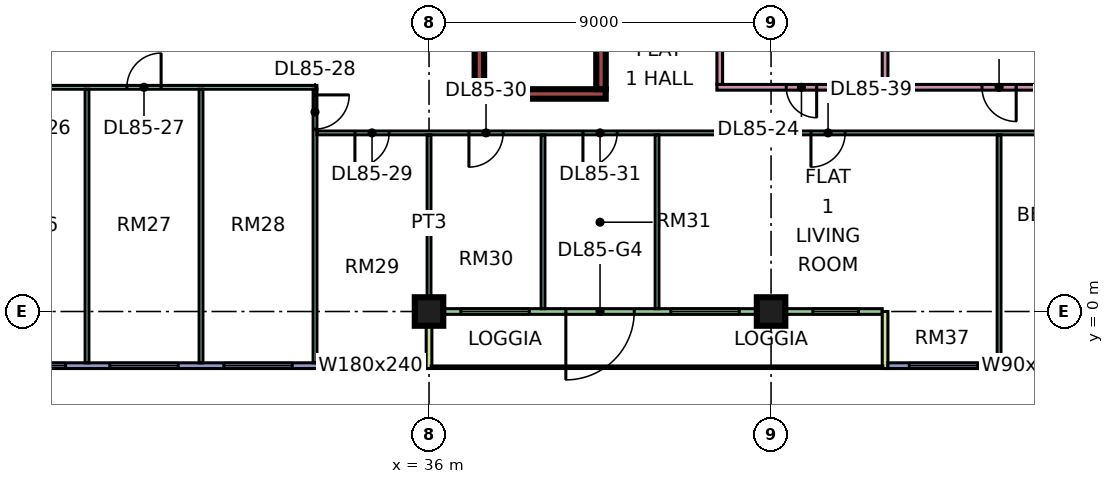
"""IFC4 building model, lengths in metres.
Left out: names, types, materials, properties, quantities, classifications, styles, units other than length and angle.
Written with IfcOpenShell. Run it as: python <this file> out.ifc"""

import sys

from ifc_helpers import new_model, si_unit, direction, frame, frame_2d, origin, origin_2d, place, context, subcontext, project, spatial, rectangle, extrude, element, fill, save


model = new_model("IFC4")
c1 = context("Model", 3, precision=1e-05, world=origin(), true_north=direction((0.0, 1.0)))
c2 = subcontext(c1, "Body", "Model", "MODEL_VIEW")
j1 = project(units=[si_unit("LENGTHUNIT", "METRE"), si_unit("PLANEANGLEUNIT", "RADIAN")], contexts=[c1])
p1 = place(None, origin())
s1 = spatial("IfcSite", under=j1, at=p1, CompositionType="ELEMENT")
p2 = place(p1, origin())
s2 = spatial("IfcBuilding", under=s1, at=p2, CompositionType="ELEMENT")
p3 = place(p2, frame((0.0, 0.0, 365.15)))
s3 = spatial("IfcBuildingStorey", under=s2, at=p3, CompositionType="ELEMENT", Elevation=365.15)
for number, where, z_axis, x_axis in (
    (1, (36.0, 0.0, 0.0), (0.0, 0.0, 1.0), (1.0, 0.0, 0.0)),
    (2, (45.0, 0.0, 0.0), (0.0, 0.0, 1.0), (1.0, 0.0, 0.0)),
):
    element("IfcColumn", number, at=place(p3, frame(where, z_axis=z_axis, x_axis=x_axis)), inside=s3, PredefinedType="COLUMN", context=c2, shape_type="SweptSolid", body=[
        extrude(rectangle(XDim=0.75, YDim=0.75, at=origin_2d()), origin(), (0.0, 0.0, 1.0), 3.75),
    ])
p4 = place(p3, frame((37.2, 5.725, 0.0), z_axis=(0.0, 0.0, 1.0), x_axis=(1.0, 0.0, 0.0)))
e3 = element("IfcWall", 3, at=p4, inside=s3, PredefinedType="SHEAR", context=c2, shape_type="SweptSolid", body=[
    extrude(rectangle(XDim=3.45, YDim=0.25, at=frame_2d((1.725, 0.0))), origin(), (0.0, 0.0, 1.0), 3.75),
])
for number, where, z_axis, x_axis in (
    (4, (37.325, 5.85, 0.0), (0.0, 0.0, 1.0), (0.0, 1.0, 0.0)),
    (5, (40.525, 5.85, 0.0), (0.0, 0.0, 1.0), (0.0, 1.0, 0.0)),
):
    element("IfcWall", number, at=place(p3, frame(where, z_axis=z_axis, x_axis=x_axis)), inside=s3, PredefinedType="SHEAR", context=c2, shape_type="SweptSolid", body=[
        extrude(rectangle(XDim=6.5, YDim=0.25, at=frame_2d((3.25, 0.0))), origin(), (0.0, 0.0, 1.0), 3.75),
    ])
p5 = place(p3, frame((24.075, -1.425, 0.0), z_axis=(0.0, 0.0, 1.0), x_axis=(1.0, 0.0, 0.0)))
e6 = element("IfcWall", 6, at=p5, inside=s3, PredefinedType="SOLIDWALL", context=c2, shape_type="SweptSolid", body=[
    extrude(rectangle(XDim=11.85, YDim=0.15, at=frame_2d((5.925, 0.0))), origin(), (0.0, 0.0, 1.0), 3.35),
])
p6 = place(p5, frame((0.562, 0.0, 0.45)))
e7 = element("IfcOpeningElement", 7, at=p6, cuts=e6, PredefinedType="OPENING", context=c2, shape_type="SweptSolid", body=[
    extrude(rectangle(XDim=1.8, YDim=2.4, at=frame_2d((0.9, 1.2))), frame((0.0, 0.085, 0.0), z_axis=(0.0, -1.0, 0.0), x_axis=(1.0, 0.0, 0.0)), (0.0, 0.0, 1.0), 0.17),
])
p7 = place(p5, frame((3.525, 0.0, 0.45)))
e8 = element("IfcOpeningElement", 8, at=p7, cuts=e6, PredefinedType="OPENING", context=c2, shape_type="SweptSolid", body=[
    extrude(rectangle(XDim=1.8, YDim=2.4, at=frame_2d((0.9, 1.2))), frame((0.0, 0.085, 0.0), z_axis=(0.0, -1.0, 0.0), x_axis=(1.0, 0.0, 0.0)), (0.0, 0.0, 1.0), 0.17),
])
p8 = place(p5, frame((6.525, 0.0, 0.45)))
e9 = element("IfcOpeningElement", 9, at=p8, cuts=e6, PredefinedType="OPENING", context=c2, shape_type="SweptSolid", body=[
    extrude(rectangle(XDim=1.8, YDim=2.4, at=frame_2d((0.9, 1.2))), frame((0.0, 0.085, 0.0), z_axis=(0.0, -1.0, 0.0), x_axis=(1.0, 0.0, 0.0)), (0.0, 0.0, 1.0), 0.17),
])
p9 = place(p5, frame((9.488, 0.0, 0.45)))
e10 = element("IfcOpeningElement", 10, at=p9, cuts=e6, PredefinedType="OPENING", context=c2, shape_type="SweptSolid", body=[
    extrude(rectangle(XDim=1.8, YDim=2.4, at=frame_2d((0.9, 1.2))), frame((0.0, 0.085, 0.0), z_axis=(0.0, -1.0, 0.0), x_axis=(1.0, 0.0, 0.0)), (0.0, 0.0, 1.0), 0.17),
])
p10 = place(p3, frame((36.075, 0.0, 0.0), z_axis=(0.0, 0.0, 1.0), x_axis=(1.0, 0.0, 0.0)))
e11 = element("IfcWall", 11, at=p10, inside=s3, PredefinedType="SOLIDWALL", context=c2, shape_type="SweptSolid", body=[
    extrude(rectangle(XDim=11.85, YDim=0.15, at=frame_2d((5.925, 0.0))), origin(), (0.0, 0.0, 1.0), 3.35),
])
p11 = place(p10, frame((0.762, 0.0, 0.45)))
e12 = element("IfcOpeningElement", 12, at=p11, cuts=e11, PredefinedType="OPENING", context=c2, shape_type="SweptSolid", body=[
    extrude(rectangle(XDim=1.8, YDim=2.4, at=frame_2d((0.9, 1.2))), frame((0.0, 0.085, 0.0), z_axis=(0.0, -1.0, 0.0), x_axis=(1.0, 0.0, 0.0)), (0.0, 0.0, 1.0), 0.17),
])
p12 = place(p10, frame((3.525, 0.0, 0.0)))
e13 = element("IfcOpeningElement", 13, at=p12, cuts=e11, PredefinedType="OPENING", context=c2, shape_type="SweptSolid", body=[
    extrude(rectangle(XDim=1.8, YDim=2.4, at=frame_2d((0.9, 1.2))), frame((0.0, 0.085, 0.0), z_axis=(0.0, -1.0, 0.0), x_axis=(1.0, 0.0, 0.0)), (0.0, 0.0, 1.0), 0.17),
])
p13 = place(p10, frame((6.288, 0.0, 0.45)))
e14 = element("IfcOpeningElement", 14, at=p13, cuts=e11, PredefinedType="OPENING", context=c2, shape_type="SweptSolid", body=[
    extrude(rectangle(XDim=1.8, YDim=2.4, at=frame_2d((0.9, 1.2))), frame((0.0, 0.085, 0.0), z_axis=(0.0, -1.0, 0.0), x_axis=(1.0, 0.0, 0.0)), (0.0, 0.0, 1.0), 0.17),
])
p14 = place(p10, frame((10.025, 0.0, 0.45)))
e15 = element("IfcOpeningElement", 15, at=p14, cuts=e11, PredefinedType="OPENING", context=c2, shape_type="SweptSolid", body=[
    extrude(rectangle(XDim=1.2, YDim=2.4, at=frame_2d((0.6, 1.2))), frame((0.0, 0.085, 0.0), z_axis=(0.0, -1.0, 0.0), x_axis=(1.0, 0.0, 0.0)), (0.0, 0.0, 1.0), 0.17),
])
for number, where, z_axis, x_axis in (
    (16, (36.0, -1.5, 0.0), (0.0, 0.0, 1.0), (0.0, 1.0, 0.0)),
    (17, (48.0, -1.5, 0.0), (0.0, 0.0, 1.0), (0.0, 1.0, 0.0)),
):
    element("IfcWall", number, at=place(p3, frame(where, z_axis=z_axis, x_axis=x_axis)), inside=s3, PredefinedType="SOLIDWALL", context=c2, shape_type="SweptSolid", body=[
        extrude(rectangle(XDim=1.5, YDim=0.15, at=frame_2d((0.75, 0.0))), origin(), (0.0, 0.0, 1.0), 3.35),
    ])
p15 = place(p3, frame((48.075, -1.425, 0.0), z_axis=(0.0, 0.0, 1.0), x_axis=(1.0, 0.0, 0.0)))
e18 = element("IfcWall", 18, at=p15, inside=s3, PredefinedType="SOLIDWALL", context=c2, shape_type="SweptSolid", body=[
    extrude(rectangle(XDim=4.425, YDim=0.15, at=frame_2d((2.212, 0.0))), origin(), (0.0, 0.0, 1.0), 3.35),
])
p16 = place(p15, frame((0.562, 0.0, 0.45)))
e19 = element("IfcOpeningElement", 19, at=p16, cuts=e18, PredefinedType="OPENING", context=c2, shape_type="SweptSolid", body=[
    extrude(rectangle(XDim=1.8, YDim=2.4, at=frame_2d((0.9, 1.2))), frame((0.0, 0.085, 0.0), z_axis=(0.0, -1.0, 0.0), x_axis=(1.0, 0.0, 0.0)), (0.0, 0.0, 1.0), 0.17),
])
p17 = place(p15, frame((3.225, 0.0, 0.45)))
e20 = element("IfcOpeningElement", 20, at=p17, cuts=e18, PredefinedType="OPENING", context=c2, shape_type="SweptSolid", body=[
    extrude(rectangle(XDim=0.9, YDim=2.4, at=frame_2d((0.45, 1.2))), frame((0.0, 0.085, 0.0), z_axis=(0.0, -1.0, 0.0), x_axis=(1.0, 0.0, 0.0)), (0.0, 0.0, 1.0), 0.17),
])
p18 = place(p3, frame((11.95, 5.9, 0.0), z_axis=(0.0, 0.0, 1.0), x_axis=(1.0, 0.0, 0.0)))
e21 = element("IfcWall", 21, at=p18, inside=s3, PredefinedType="PARTITIONING", context=c2, shape_type="SweptSolid", body=[
    extrude(rectangle(XDim=21.1, YDim=0.1, at=frame_2d((10.55, 0.0))), origin(), (0.0, 0.0, 1.0), 3.35),
])
p19 = place(p18, frame((1.1, 0.0, 0.0)))
e22 = element("IfcOpeningElement", 22, at=p19, cuts=e21, PredefinedType="OPENING", context=c2, shape_type="SweptSolid", body=[
    extrude(rectangle(XDim=0.9, YDim=2.1, at=frame_2d((0.45, 1.05))), frame((0.0, 0.06, 0.0), z_axis=(0.0, -1.0, 0.0), x_axis=(1.0, 0.0, 0.0)), (0.0, 0.0, 1.0), 0.12),
])
p20 = place(p18, frame((13.1, 0.0, 0.0)))
e23 = element("IfcOpeningElement", 23, at=p20, cuts=e21, PredefinedType="OPENING", context=c2, shape_type="SweptSolid", body=[
    extrude(rectangle(XDim=0.9, YDim=2.1, at=frame_2d((0.45, 1.05))), frame((0.0, 0.06, 0.0), z_axis=(0.0, -1.0, 0.0), x_axis=(1.0, 0.0, 0.0)), (0.0, 0.0, 1.0), 0.12),
])
p21 = place(p18, frame((16.1, 0.0, 0.0)))
e24 = element("IfcOpeningElement", 24, at=p21, cuts=e21, PredefinedType="OPENING", context=c2, shape_type="SweptSolid", body=[
    extrude(rectangle(XDim=0.9, YDim=2.1, at=frame_2d((0.45, 1.05))), frame((0.0, 0.06, 0.0), z_axis=(0.0, -1.0, 0.0), x_axis=(1.0, 0.0, 0.0)), (0.0, 0.0, 1.0), 0.12),
])
p22 = place(p18, frame((7.1, 0.0, 0.0)))
e25 = element("IfcOpeningElement", 25, at=p22, cuts=e21, PredefinedType="OPENING", context=c2, shape_type="SweptSolid", body=[
    extrude(rectangle(XDim=0.9, YDim=2.1, at=frame_2d((0.45, 1.05))), frame((0.0, 0.06, 0.0), z_axis=(0.0, -1.0, 0.0), x_axis=(1.0, 0.0, 0.0)), (0.0, 0.0, 1.0), 0.12),
])
for number, where, z_axis, x_axis in (
    (26, (27.0, -1.351, 0.0), (0.0, 0.0, 1.0), (0.0, 1.0, 0.0)),
    (27, (30.0, -1.351, 0.0), (0.0, 0.0, 1.0), (0.0, 1.0, 0.0)),
):
    element("IfcWall", number, at=place(p3, frame(where, z_axis=z_axis, x_axis=x_axis)), inside=s3, PredefinedType="PARTITIONING", context=c2, shape_type="SweptSolid", body=[
        extrude(rectangle(XDim=7.201, YDim=0.1, at=frame_2d((3.601, 0.0))), origin(), (0.0, 0.0, 1.0), 3.35),
    ])
p23 = place(p3, frame((33.0, -1.351, 0.0), z_axis=(0.0, 0.0, 1.0), x_axis=(0.0, 1.0, 0.0)))
e28 = element("IfcWall", 28, at=p23, inside=s3, PredefinedType="PARTITIONING", context=c2, shape_type="SweptSolid", body=[
    extrude(rectangle(XDim=7.201, YDim=0.1, at=frame_2d((3.601, 0.0))), origin(), (0.0, 0.0, 1.0), 3.35),
])
p24 = place(p23, frame((6.151, 0.0, 0.0)))
e29 = element("IfcOpeningElement", 29, at=p24, cuts=e28, PredefinedType="OPENING", context=c2, shape_type="SweptSolid", body=[
    extrude(rectangle(XDim=0.9, YDim=2.1, at=frame_2d((0.45, 1.05))), frame((0.0, 0.06, 0.0), z_axis=(0.0, -1.0, 0.0), x_axis=(1.0, 0.0, 0.0)), (0.0, 0.0, 1.0), 0.12),
])
p25 = place(p3, frame((33.05, 4.7, 0.0), z_axis=(0.0, 0.0, 1.0), x_axis=(1.0, 0.0, 0.0)))
e30 = element("IfcWall", 30, at=p25, inside=s3, PredefinedType="PARTITIONING", context=c2, shape_type="SweptSolid", body=[
    extrude(rectangle(XDim=22.301, YDim=0.1, at=frame_2d((11.15, 0.0))), origin(), (0.0, 0.0, 1.0), 3.35),
])
p26 = place(p25, frame((1.0, 0.0, 0.0)))
e31 = element("IfcOpeningElement", 31, at=p26, cuts=e30, PredefinedType="OPENING", context=c2, shape_type="SweptSolid", body=[
    extrude(rectangle(XDim=0.9, YDim=2.1, at=frame_2d((0.45, 1.05))), frame((0.0, 0.06, 0.0), z_axis=(0.0, -1.0, 0.0), x_axis=(1.0, 0.0, 0.0)), (0.0, 0.0, 1.0), 0.12),
])
p27 = place(p25, frame((4.0, 0.0, 0.0)))
e32 = element("IfcOpeningElement", 32, at=p27, cuts=e30, PredefinedType="OPENING", context=c2, shape_type="SweptSolid", body=[
    extrude(rectangle(XDim=0.9, YDim=2.1, at=frame_2d((0.45, 1.05))), frame((0.0, 0.06, 0.0), z_axis=(0.0, -1.0, 0.0), x_axis=(1.0, 0.0, 0.0)), (0.0, 0.0, 1.0), 0.12),
])
p28 = place(p25, frame((7.0, 0.0, 0.0)))
e33 = element("IfcOpeningElement", 33, at=p28, cuts=e30, PredefinedType="OPENING", context=c2, shape_type="SweptSolid", body=[
    extrude(rectangle(XDim=0.9, YDim=2.1, at=frame_2d((0.45, 1.05))), frame((0.0, 0.06, 0.0), z_axis=(0.0, -1.0, 0.0), x_axis=(1.0, 0.0, 0.0)), (0.0, 0.0, 1.0), 0.12),
])
p29 = place(p25, frame((19.0, 0.0, 0.0)))
e34 = element("IfcOpeningElement", 34, at=p29, cuts=e30, PredefinedType="OPENING", context=c2, shape_type="SweptSolid", body=[
    extrude(rectangle(XDim=0.9, YDim=2.1, at=frame_2d((0.45, 1.05))), frame((0.0, 0.06, 0.0), z_axis=(0.0, -1.0, 0.0), x_axis=(1.0, 0.0, 0.0)), (0.0, 0.0, 1.0), 0.12),
])
p30 = place(p25, frame((13.0, 0.0, 0.0)))
e35 = element("IfcOpeningElement", 35, at=p30, cuts=e30, PredefinedType="OPENING", context=c2, shape_type="SweptSolid", body=[
    extrude(rectangle(XDim=0.9, YDim=2.1, at=frame_2d((0.45, 1.05))), frame((0.0, 0.06, 0.0), z_axis=(0.0, -1.0, 0.0), x_axis=(1.0, 0.0, 0.0)), (0.0, 0.0, 1.0), 0.12),
])
p31 = place(p3, frame((36.0, 0.0, 0.0), z_axis=(0.0, 0.0, 1.0), x_axis=(0.0, 1.0, 0.0)))
e36 = element("IfcWall", 36, at=p31, inside=s3, PredefinedType="PARTITIONING", context=c2, shape_type="SweptSolid", body=[
    extrude(rectangle(XDim=4.65, YDim=0.1, at=frame_2d((2.325, 0.0))), origin(), (0.0, 0.0, 1.0), 3.35),
])
for number, where, z_axis, x_axis in (
    (37, (39.0, 0.074, 0.0), (0.0, 0.0, 1.0), (0.0, 1.0, 0.0)),
    (38, (42.0, 0.074, 0.0), (0.0, 0.0, 1.0), (0.0, 1.0, 0.0)),
):
    element("IfcWall", number, at=place(p3, frame(where, z_axis=z_axis, x_axis=x_axis)), inside=s3, PredefinedType="PARTITIONING", context=c2, shape_type="SweptSolid", body=[
        extrude(rectangle(XDim=4.576, YDim=0.1, at=frame_2d((2.288, 0.0))), origin(), (0.0, 0.0, 1.0), 3.35),
    ])
p32 = place(p3, frame((43.575, 5.9, 0.0), z_axis=(0.0, 0.0, 1.0), x_axis=(1.0, 0.0, 0.0)))
e39 = element("IfcWall", 39, at=p32, inside=s3, PredefinedType="PARTITIONING", context=c2, shape_type="SweptSolid", body=[
    extrude(rectangle(XDim=11.775, YDim=0.15, at=frame_2d((5.888, 0.0))), origin(), (0.0, 0.0, 1.0), 3.35),
])
p33 = place(p32, frame((1.825, 0.0, 0.0)))
e40 = element("IfcOpeningElement", 40, at=p33, cuts=e39, PredefinedType="OPENING", context=c2, shape_type="SweptSolid", body=[
    extrude(rectangle(XDim=0.8, YDim=2.1, at=frame_2d((0.4, 1.05))), frame((0.0, 0.085, 0.0), z_axis=(0.0, -1.0, 0.0), x_axis=(1.0, 0.0, 0.0)), (0.0, 0.0, 1.0), 0.17),
])
p34 = place(p32, frame((6.975, 0.0, 0.0)))
e41 = element("IfcOpeningElement", 41, at=p34, cuts=e39, PredefinedType="OPENING", context=c2, shape_type="SweptSolid", body=[
    extrude(rectangle(XDim=0.9, YDim=2.1, at=frame_2d((0.45, 1.05))), frame((0.0, 0.085, 0.0), z_axis=(0.0, -1.0, 0.0), x_axis=(1.0, 0.0, 0.0)), (0.0, 0.0, 1.0), 0.17),
])
p35 = place(p3, frame((43.65, 5.975, 0.0), z_axis=(0.0, 0.0, 1.0), x_axis=(0.0, 1.0, 0.0)))
e42 = element("IfcWall", 42, at=p35, inside=s3, PredefinedType="PARTITIONING", context=c2, shape_type="SweptSolid", body=[
    extrude(rectangle(XDim=6.3, YDim=0.15, at=frame_2d((3.15, 0.0))), origin(), (0.0, 0.0, 1.0), 3.35),
])
p36 = place(p35, frame((4.275, 0.0, 0.0)))
e43 = element("IfcOpeningElement", 43, at=p36, cuts=e42, PredefinedType="OPENING", context=c2, shape_type="SweptSolid", body=[
    extrude(rectangle(XDim=0.9, YDim=2.1, at=frame_2d((0.45, 1.05))), frame((0.0, 0.085, 0.0), z_axis=(0.0, -1.0, 0.0), x_axis=(1.0, 0.0, 0.0)), (0.0, 0.0, 1.0), 0.17),
])
p37 = place(p3, frame((48.0, 5.975, 0.0), z_axis=(0.0, 0.0, 1.0), x_axis=(0.0, 1.0, 0.0)))
e44 = element("IfcWall", 44, at=p37, inside=s3, PredefinedType="PARTITIONING", context=c2, shape_type="SweptSolid", body=[
    extrude(rectangle(XDim=6.3, YDim=0.15, at=frame_2d((3.15, 0.0))), origin(), (0.0, 0.0, 1.0), 3.35),
])
p38 = place(p3, frame((51.0, -1.35, 0.0), z_axis=(0.0, 0.0, 1.0), x_axis=(0.0, 1.0, 0.0)))
e45 = element("IfcWall", 45, at=p38, inside=s3, PredefinedType="PARTITIONING", context=c2, shape_type="SweptSolid", body=[
    extrude(rectangle(XDim=6.0, YDim=0.1, at=frame_2d((3.0, 0.0))), origin(), (0.0, 0.0, 1.0), 3.35),
])
p39 = place(p6, origin())
e46 = element("IfcWindow", 46, at=p39, inside=s3, PartitioningType="SINGLE_PANEL", PredefinedType="WINDOW", context=c2, shape_type="SweptSolid", body=[
    extrude(rectangle(XDim=1.8, YDim=2.4, at=frame_2d((0.9, 1.2))), frame((0.0, 0.03, 0.0), z_axis=(0.0, -1.0, 0.0), x_axis=(1.0, 0.0, 0.0)), (0.0, 0.0, 1.0), 0.06),
])
fill(e7, e46)
p40 = place(p7, origin())
e47 = element("IfcWindow", 47, at=p40, inside=s3, PartitioningType="SINGLE_PANEL", PredefinedType="WINDOW", context=c2, shape_type="SweptSolid", body=[
    extrude(rectangle(XDim=1.8, YDim=2.4, at=frame_2d((0.9, 1.2))), frame((0.0, 0.03, 0.0), z_axis=(0.0, -1.0, 0.0), x_axis=(1.0, 0.0, 0.0)), (0.0, 0.0, 1.0), 0.06),
])
fill(e8, e47)
p41 = place(p8, origin())
e48 = element("IfcWindow", 48, at=p41, inside=s3, PartitioningType="SINGLE_PANEL", PredefinedType="WINDOW", context=c2, shape_type="SweptSolid", body=[
    extrude(rectangle(XDim=1.8, YDim=2.4, at=frame_2d((0.9, 1.2))), frame((0.0, 0.03, 0.0), z_axis=(0.0, -1.0, 0.0), x_axis=(1.0, 0.0, 0.0)), (0.0, 0.0, 1.0), 0.06),
])
fill(e9, e48)
p42 = place(p9, origin())
e49 = element("IfcWindow", 49, at=p42, inside=s3, PartitioningType="SINGLE_PANEL", PredefinedType="WINDOW", context=c2, shape_type="SweptSolid", body=[
    extrude(rectangle(XDim=1.8, YDim=2.4, at=frame_2d((0.9, 1.2))), frame((0.0, 0.03, 0.0), z_axis=(0.0, -1.0, 0.0), x_axis=(1.0, 0.0, 0.0)), (0.0, 0.0, 1.0), 0.06),
])
fill(e10, e49)
p43 = place(p11, origin())
e50 = element("IfcWindow", 50, at=p43, inside=s3, PartitioningType="SINGLE_PANEL", PredefinedType="WINDOW", context=c2, shape_type="SweptSolid", body=[
    extrude(rectangle(XDim=1.8, YDim=2.4, at=frame_2d((0.9, 1.2))), frame((0.0, 0.03, 0.0), z_axis=(0.0, -1.0, 0.0), x_axis=(1.0, 0.0, 0.0)), (0.0, 0.0, 1.0), 0.06),
])
fill(e12, e50)
p44 = place(p12, frame((1.8, 0.0, 0.0), z_axis=(0.0, 0.0, 1.0), x_axis=(-1.0, 0.0, 0.0)))
e51 = element("IfcDoor", 51, at=p44, inside=s3, OperationType="DOUBLE_DOOR_SINGLE_SWING", PredefinedType="DOOR", context=c2, shape_type="SweptSolid", body=[
    extrude(rectangle(XDim=1.8, YDim=2.4, at=frame_2d((0.9, 1.2))), frame((0.0, 0.025, 0.0), z_axis=(0.0, -1.0, 0.0), x_axis=(1.0, 0.0, 0.0)), (0.0, 0.0, 1.0), 0.05),
])
fill(e13, e51)
p45 = place(p13, origin())
e52 = element("IfcWindow", 52, at=p45, inside=s3, PartitioningType="SINGLE_PANEL", PredefinedType="WINDOW", context=c2, shape_type="SweptSolid", body=[
    extrude(rectangle(XDim=1.8, YDim=2.4, at=frame_2d((0.9, 1.2))), frame((0.0, 0.03, 0.0), z_axis=(0.0, -1.0, 0.0), x_axis=(1.0, 0.0, 0.0)), (0.0, 0.0, 1.0), 0.06),
])
fill(e14, e52)
p46 = place(p14, origin())
e53 = element("IfcWindow", 53, at=p46, inside=s3, PartitioningType="SINGLE_PANEL", PredefinedType="WINDOW", context=c2, shape_type="SweptSolid", body=[
    extrude(rectangle(XDim=1.2, YDim=2.4, at=frame_2d((0.6, 1.2))), frame((0.0, 0.03, 0.0), z_axis=(0.0, -1.0, 0.0), x_axis=(1.0, 0.0, 0.0)), (0.0, 0.0, 1.0), 0.06),
])
fill(e15, e53)
p47 = place(p16, origin())
e54 = element("IfcWindow", 54, at=p47, inside=s3, PartitioningType="SINGLE_PANEL", PredefinedType="WINDOW", context=c2, shape_type="SweptSolid", body=[
    extrude(rectangle(XDim=1.8, YDim=2.4, at=frame_2d((0.9, 1.2))), frame((0.0, 0.03, 0.0), z_axis=(0.0, -1.0, 0.0), x_axis=(1.0, 0.0, 0.0)), (0.0, 0.0, 1.0), 0.06),
])
fill(e19, e54)
p48 = place(p17, origin())
e55 = element("IfcWindow", 55, at=p48, inside=s3, PartitioningType="SINGLE_PANEL", PredefinedType="WINDOW", context=c2, shape_type="SweptSolid", body=[
    extrude(rectangle(XDim=0.9, YDim=2.4, at=frame_2d((0.45, 1.2))), frame((0.0, 0.03, 0.0), z_axis=(0.0, -1.0, 0.0), x_axis=(1.0, 0.0, 0.0)), (0.0, 0.0, 1.0), 0.06),
])
fill(e20, e55)
p49 = place(p33, origin())
e56 = element("IfcDoor", 56, at=p49, inside=s3, OperationType="SINGLE_SWING_RIGHT", PredefinedType="DOOR", context=c2, shape_type="SweptSolid", body=[
    extrude(rectangle(XDim=0.8, YDim=2.1, at=frame_2d((0.4, 1.05))), frame((0.0, 0.025, 0.0), z_axis=(0.0, -1.0, 0.0), x_axis=(1.0, 0.0, 0.0)), (0.0, 0.0, 1.0), 0.05),
])
fill(e40, e56)
p50 = place(p21, frame((0.9, 0.0, 0.0), z_axis=(0.0, 0.0, 1.0), x_axis=(-1.0, 0.0, 0.0)))
e57 = element("IfcDoor", 57, at=p50, inside=s3, OperationType="SINGLE_SWING_RIGHT", PredefinedType="DOOR", context=c2, shape_type="SweptSolid", body=[
    extrude(rectangle(XDim=0.9, YDim=2.1, at=frame_2d((0.45, 1.05))), frame((0.0, 0.025, 0.0), z_axis=(0.0, -1.0, 0.0), x_axis=(1.0, 0.0, 0.0)), (0.0, 0.0, 1.0), 0.05),
])
fill(e24, e57)
p51 = place(p24, origin())
e58 = element("IfcDoor", 58, at=p51, inside=s3, OperationType="SINGLE_SWING_RIGHT", PredefinedType="DOOR", context=c2, shape_type="SweptSolid", body=[
    extrude(rectangle(XDim=0.9, YDim=2.1, at=frame_2d((0.45, 1.05))), frame((0.0, 0.025, 0.0), z_axis=(0.0, -1.0, 0.0), x_axis=(1.0, 0.0, 0.0)), (0.0, 0.0, 1.0), 0.05),
])
fill(e29, e58)
p52 = place(p26, frame((0.9, 0.0, 0.0), z_axis=(0.0, 0.0, 1.0), x_axis=(-1.0, 0.0, 0.0)))
e59 = element("IfcDoor", 59, at=p52, inside=s3, OperationType="SINGLE_SWING_LEFT", PredefinedType="DOOR", context=c2, shape_type="SweptSolid", body=[
    extrude(rectangle(XDim=0.9, YDim=2.1, at=frame_2d((0.45, 1.05))), frame((0.0, 0.025, 0.0), z_axis=(0.0, -1.0, 0.0), x_axis=(1.0, 0.0, 0.0)), (0.0, 0.0, 1.0), 0.05),
])
fill(e31, e59)
p53 = place(p27, frame((0.9, 0.0, 0.0), z_axis=(0.0, 0.0, 1.0), x_axis=(-1.0, 0.0, 0.0)))
e60 = element("IfcDoor", 60, at=p53, inside=s3, OperationType="SINGLE_SWING_LEFT", PredefinedType="DOOR", context=c2, shape_type="SweptSolid", body=[
    extrude(rectangle(XDim=0.9, YDim=2.1, at=frame_2d((0.45, 1.05))), frame((0.0, 0.025, 0.0), z_axis=(0.0, -1.0, 0.0), x_axis=(1.0, 0.0, 0.0)), (0.0, 0.0, 1.0), 0.05),
])
fill(e32, e60)
p54 = place(p28, frame((0.9, 0.0, 0.0), z_axis=(0.0, 0.0, 1.0), x_axis=(-1.0, 0.0, 0.0)))
e61 = element("IfcDoor", 61, at=p54, inside=s3, OperationType="SINGLE_SWING_LEFT", PredefinedType="DOOR", context=c2, shape_type="SweptSolid", body=[
    extrude(rectangle(XDim=0.9, YDim=2.1, at=frame_2d((0.45, 1.05))), frame((0.0, 0.025, 0.0), z_axis=(0.0, -1.0, 0.0), x_axis=(1.0, 0.0, 0.0)), (0.0, 0.0, 1.0), 0.05),
])
fill(e33, e61)
p55 = place(p34, origin())
e62 = element("IfcDoor", 62, at=p55, inside=s3, OperationType="SINGLE_SWING_RIGHT", PredefinedType="DOOR", context=c2, shape_type="SweptSolid", body=[
    extrude(rectangle(XDim=0.9, YDim=2.1, at=frame_2d((0.45, 1.05))), frame((0.0, 0.025, 0.0), z_axis=(0.0, -1.0, 0.0), x_axis=(1.0, 0.0, 0.0)), (0.0, 0.0, 1.0), 0.05),
])
fill(e41, e62)
p56 = place(p30, frame((0.9, 0.0, 0.0), z_axis=(0.0, 0.0, 1.0), x_axis=(-1.0, 0.0, 0.0)))
e63 = element("IfcDoor", 63, at=p56, inside=s3, OperationType="SINGLE_SWING_LEFT", PredefinedType="DOOR", context=c2, shape_type="SweptSolid", body=[
    extrude(rectangle(XDim=0.9, YDim=2.1, at=frame_2d((0.45, 1.05))), frame((0.0, 0.025, 0.0), z_axis=(0.0, -1.0, 0.0), x_axis=(1.0, 0.0, 0.0)), (0.0, 0.0, 1.0), 0.05),
])
fill(e35, e63)
save(model, sys.argv[1])
